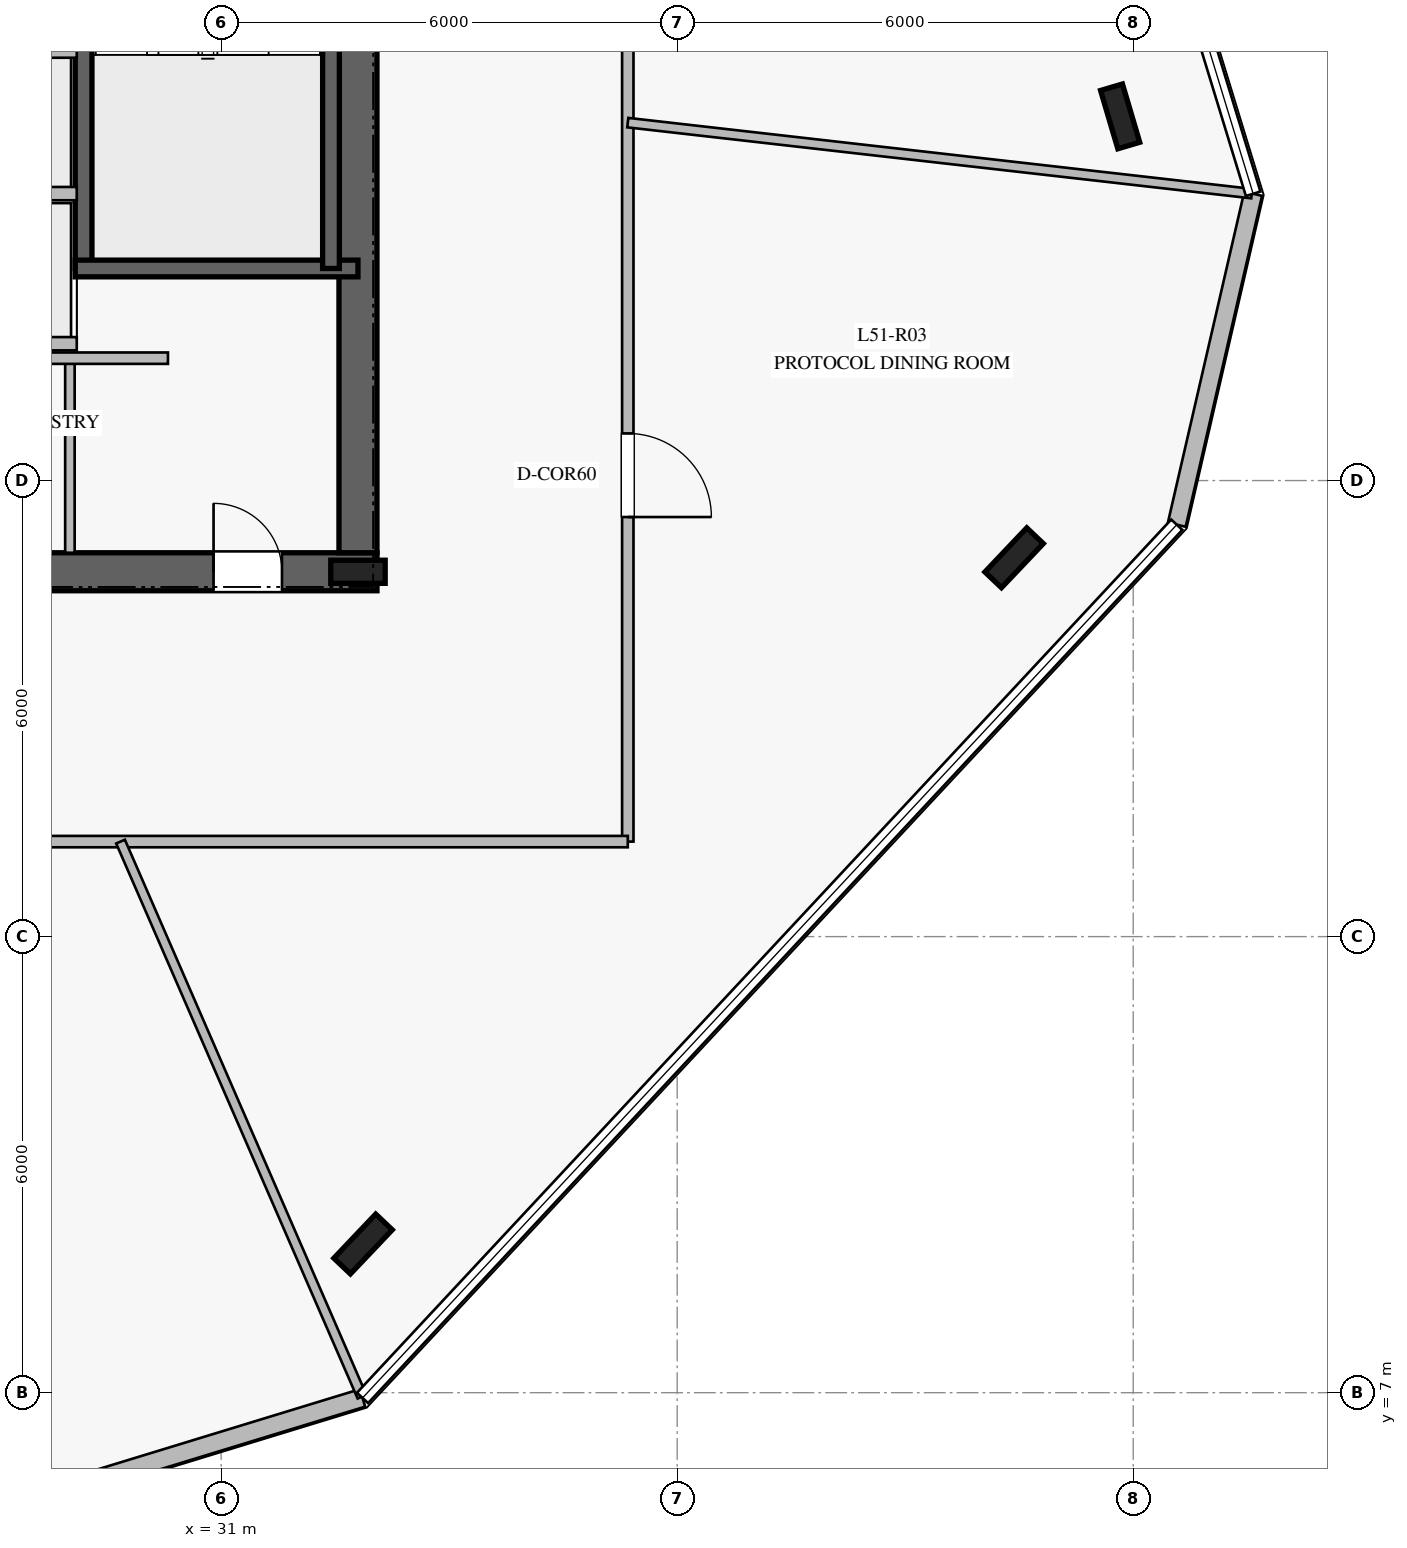
"""IFC4 building model, lengths in metres.
Left out: names, types, materials, properties, quantities, classifications, styles, units other than length and angle.
Written with IfcOpenShell. Run it as: python <this file> out.ifc"""

import sys

from ifc_helpers import new_model, si_unit, direction, frame, frame_2d, origin, origin_2d, place, context, subcontext, project, spatial, rectangle, i_section, extrude, element, fill, save


model = new_model("IFC4")
c1 = context("Model", 3, precision=1e-05, world=origin(), true_north=direction((0.0, 1.0)))
c2 = subcontext(c1, "Body", "Model", "MODEL_VIEW")
j1 = project(units=[si_unit("LENGTHUNIT", "METRE"), si_unit("PLANEANGLEUNIT", "RADIAN")], contexts=[c1])
p1 = place(None, origin())
s1 = spatial("IfcSite", under=j1, at=p1, CompositionType="ELEMENT")
p2 = place(p1, origin())
s2 = spatial("IfcBuilding", under=s1, at=p2, CompositionType="ELEMENT")
p3 = place(p2, frame((0.0, 0.0, 212.8)))
s3 = spatial("IfcBuildingStorey", under=s2, at=p3, CompositionType="ELEMENT", Elevation=212.8)
p4 = place(p3, frame((16.95, 17.8, 0.0), z_axis=(0.0, 0.0, 1.0), x_axis=(1.0, 0.0, 0.0)))
e1 = element("IfcWall", 1, at=p4, inside=s3, PredefinedType="SHEAR", context=c2, shape_type="SweptSolid", body=[
    extrude(rectangle(XDim=16.1, YDim=0.5, at=frame_2d((8.05, 0.0))), origin(), (0.0, 0.0, 1.0), 3.78),
])
p5 = place(p4, frame((5.0, 0.0, 0.0)))
e2 = element("IfcOpeningElement", 2, at=p5, cuts=e1, PredefinedType="OPENING", context=c2, shape_type="SweptSolid", body=[
    extrude(rectangle(XDim=1.2, YDim=2.25, at=frame_2d((0.6, 1.125))), frame((0.0, 0.26, 0.0), z_axis=(0.0, -1.0, 0.0), x_axis=(1.0, 0.0, 0.0)), (0.0, 0.0, 1.0), 0.52),
])
p6 = place(p4, frame((13.95, 0.0, 0.0)))
e3 = element("IfcOpeningElement", 3, at=p6, cuts=e1, PredefinedType="OPENING", context=c2, shape_type="SweptSolid", body=[
    extrude(rectangle(XDim=0.9, YDim=2.1, at=frame_2d((0.45, 1.05))), frame((0.0, 0.26, 0.0), z_axis=(0.0, -1.0, 0.0), x_axis=(1.0, 0.0, 0.0)), (0.0, 0.0, 1.0), 0.52),
])
p7 = place(p4, frame((9.2, 0.0, 0.0)))
e4 = element("IfcOpeningElement", 4, at=p7, cuts=e1, PredefinedType="OPENING", context=c2, shape_type="SweptSolid", body=[
    extrude(rectangle(XDim=1.1, YDim=2.2, at=frame_2d((0.55, 1.1))), frame((0.0, 0.26, 0.0), z_axis=(0.0, -1.0, 0.0), x_axis=(1.0, 0.0, 0.0)), (0.0, 0.0, 1.0), 0.52),
])
p8 = place(p3, frame((32.8, 18.05, 0.0), z_axis=(0.0, 0.0, 1.0), x_axis=(0.0, 1.0, 0.0)))
e5 = element("IfcWall", 5, at=p8, inside=s3, PredefinedType="SHEAR", context=c2, shape_type="SweptSolid", body=[
    extrude(rectangle(XDim=13.9, YDim=0.5, at=frame_2d((6.95, 0.0))), origin(), (0.0, 0.0, 1.0), 3.78),
])
p9 = place(p3, frame((32.8, 17.8, 0.0), z_axis=(0.0, 0.0, 1.0), x_axis=(1.0, 0.0, 0.0)))
e6 = element("IfcColumn", 6, at=p9, inside=s3, PredefinedType="COLUMN", context=c2, shape_type="SweptSolid", body=[
    extrude(i_section(OverallWidth=0.304, OverallDepth=0.716, WebThickness=0.021, FlangeThickness=0.04, at=origin_2d()), origin(), (0.0, 0.0, 1.0), 4.0),
])
p10 = place(p3, frame((29.19, 21.79, 0.0), z_axis=(0.0, 0.0, 1.0), x_axis=(0.0, 1.0, 0.0)))
e7 = element("IfcWall", 7, at=p10, inside=s3, PredefinedType="SOLIDWALL", context=c2, shape_type="SweptSolid", body=[
    extrude(rectangle(XDim=7.22, YDim=0.22, at=frame_2d((3.61, 0.0))), origin(), (0.0, 0.0, 1.0), 3.78),
])
p11 = place(p10, frame((5.88, 0.0, 0.0)))
e8 = element("IfcOpeningElement", 8, at=p11, cuts=e7, PredefinedType="OPENING", context=c2, shape_type="SweptSolid", body=[
    extrude(rectangle(XDim=1.15, YDim=2.2, at=frame_2d((0.575, 1.1))), frame((0.0, 0.12, 0.0), z_axis=(0.0, -1.0, 0.0), x_axis=(1.0, 0.0, 0.0)), (0.0, 0.0, 1.0), 0.24),
])
p12 = place(p3, frame((29.08, 21.79, 0.0), z_axis=(0.0, 0.0, 1.0), x_axis=(1.0, 0.0, 0.0)))
e9 = element("IfcWall", 9, at=p12, inside=s3, PredefinedType="SOLIDWALL", context=c2, shape_type="SweptSolid", body=[
    extrude(rectangle(XDim=3.72, YDim=0.22, at=frame_2d((1.86, 0.0))), origin(), (0.0, 0.0, 1.0), 3.78),
])
p13 = place(p3, frame((32.445, 29.01, 0.0), z_axis=(0.0, 0.0, 1.0), x_axis=(0.0, -1.0, 0.0)))
e10 = element("IfcWall", 10, at=p13, inside=s3, PredefinedType="SOLIDWALL", context=c2, shape_type="SweptSolid", body=[
    extrude(rectangle(XDim=7.22, YDim=0.22, at=frame_2d((3.61, 0.0))), origin(), (0.0, 0.0, 1.0), 3.78),
])
for number, where, z_axis, x_axis in (
    (11, (32.867, 8.956, 0.0), (0.0, 0.0, 1.0), (0.688, 0.725, 0.0)),
    (12, (41.433, 17.984, 0.0), (0.0, 0.0, 1.0), (0.688, 0.725, 0.0)),
    (13, (42.828, 23.791, 0.0), (0.0, 0.0, 1.0), (-0.284, 0.959, 0.0)),
):
    element("IfcColumn", number, at=place(p3, frame(where, z_axis=z_axis, x_axis=x_axis)), inside=s3, PredefinedType="COLUMN", context=c2, shape_type="SweptSolid", body=[
        extrude(i_section(OverallWidth=0.3, OverallDepth=0.8, WebThickness=0.018, FlangeThickness=0.033, at=origin_2d()), origin(), (0.0, 0.0, 1.0), 4.0),
    ])
p14 = place(p3, frame((28.588, 5.625, 0.0), z_axis=(0.0, 0.0, 1.0), x_axis=(0.956319747301, 0.29232266577, 0.0)))
e14 = element("IfcWall", 14, at=p14, inside=s3, PredefinedType="STANDARD", context=c2, shape_type="SweptSolid", body=[
    extrude(rectangle(XDim=4.467, YDim=0.24, at=frame_2d((2.234, 0.0))), origin(), (0.0, 0.0, 1.0), 3.78),
])
p15 = place(p3, frame((43.573, 18.419, 0.0), z_axis=(0.0, 0.0, 1.0), x_axis=(0.224883448427, 0.974385670371, 0.0)))
e15 = element("IfcWall", 15, at=p15, inside=s3, PredefinedType="STANDARD", context=c2, shape_type="SweptSolid", body=[
    extrude(rectangle(XDim=4.469, YDim=0.24, at=frame_2d((2.234, 0.0))), origin(), (0.0, 0.0, 1.0), 3.78),
])
p16 = place(p3, frame((29.01, 18.05, 0.0), z_axis=(0.0, 0.0, 1.0), x_axis=(0.0, 1.0, 0.0)))
e16 = element("IfcWall", 16, at=p16, inside=s3, PredefinedType="PARTITIONING", context=c2, shape_type="SweptSolid", body=[
    extrude(rectangle(XDim=2.5, YDim=0.125, at=frame_2d((1.25, 0.0))), origin(), (0.0, 0.0, 1.0), 3.78),
])
p17 = place(p3, frame((24.4, 20.61, 0.0), z_axis=(0.0, 0.0, 1.0), x_axis=(1.0, 0.0, 0.0)))
e17 = element("IfcWall", 17, at=p17, inside=s3, PredefinedType="PARTITIONING", context=c2, shape_type="SweptSolid", body=[
    extrude(rectangle(XDim=5.9, YDim=0.15, at=frame_2d((2.95, 0.0))), origin(), (0.0, 0.0, 1.0), 3.78),
])
for number, where, z_axis, x_axis in (
    (18, (26.75, 20.8, 0.0), (0.0, 0.0, 1.0), (1.0, 0.0, 0.0)),
    (19, (26.75, 22.775, 0.0), (0.0, 0.0, 1.0), (1.0, 0.0, 0.0)),
    (20, (26.75, 24.65, 0.0), (0.0, 0.0, 1.0), (1.0, 0.0, 0.0)),
):
    element("IfcWall", number, at=place(p3, frame(where, z_axis=z_axis, x_axis=x_axis)), inside=s3, PredefinedType="PARTITIONING", context=c2, shape_type="SweptSolid", body=[
        extrude(rectangle(XDim=2.35, YDim=0.175, at=frame_2d((1.175, 0.0))), origin(), (0.0, 0.0, 1.0), 3.78),
    ])
p18 = place(p3, frame((36.35, 35.75, 0.0), z_axis=(0.0, 0.0, 1.0), x_axis=(0.0, -1.0, 0.0)))
e21 = element("IfcWall", 21, at=p18, inside=s3, PredefinedType="PARTITIONING", context=c2, shape_type="SweptSolid", body=[
    extrude(rectangle(XDim=21.5, YDim=0.15, at=frame_2d((10.75, 0.0))), origin(), (0.0, 0.0, 1.0), 3.02),
])
p19 = place(p18, frame((16.13, 0.0, 0.0)))
e22 = element("IfcOpeningElement", 22, at=p19, cuts=e21, PredefinedType="OPENING", context=c2, shape_type="SweptSolid", body=[
    extrude(rectangle(XDim=1.1, YDim=2.2, at=frame_2d((0.55, 1.1))), frame((0.0, 0.085, 0.0), z_axis=(0.0, -1.0, 0.0), x_axis=(1.0, 0.0, 0.0)), (0.0, 0.0, 1.0), 0.17),
])
p20 = place(p18, frame((5.966, 0.0, 0.0)))
e23 = element("IfcOpeningElement", 23, at=p20, cuts=e21, PredefinedType="OPENING", context=c2, shape_type="SweptSolid", body=[
    extrude(rectangle(XDim=1.1, YDim=2.2, at=frame_2d((0.55, 1.1))), frame((0.0, 0.085, 0.0), z_axis=(0.0, -1.0, 0.0), x_axis=(1.0, 0.0, 0.0)), (0.0, 0.0, 1.0), 0.17),
])
p21 = place(p3, frame((36.35, 14.25, 0.0), z_axis=(0.0, 0.0, 1.0), x_axis=(-1.0, 0.0, 0.0)))
e24 = element("IfcWall", 24, at=p21, inside=s3, PredefinedType="PARTITIONING", context=c2, shape_type="SweptSolid", body=[
    extrude(rectangle(XDim=22.7, YDim=0.15, at=frame_2d((11.35, 0.0))), origin(), (0.0, 0.0, 1.0), 3.02),
])
p22 = place(p21, frame((18.757, 0.0, 0.0)))
e25 = element("IfcOpeningElement", 25, at=p22, cuts=e24, PredefinedType="OPENING", context=c2, shape_type="SweptSolid", body=[
    extrude(rectangle(XDim=1.1, YDim=2.2, at=frame_2d((0.55, 1.1))), frame((0.0, 0.085, 0.0), z_axis=(0.0, -1.0, 0.0), x_axis=(1.0, 0.0, 0.0)), (0.0, 0.0, 1.0), 0.17),
])
p23 = place(p21, frame((10.91, 0.0, 0.0)))
e26 = element("IfcOpeningElement", 26, at=p23, cuts=e24, PredefinedType="OPENING", context=c2, shape_type="SweptSolid", body=[
    extrude(rectangle(XDim=1.1, YDim=2.2, at=frame_2d((0.55, 1.1))), frame((0.0, 0.085, 0.0), z_axis=(0.0, -1.0, 0.0), x_axis=(1.0, 0.0, 0.0)), (0.0, 0.0, 1.0), 0.17),
])
p24 = place(p3, frame((29.676, 14.25, 0.0), z_axis=(0.0, 0.0, 1.0), x_axis=(0.398960400316, -0.916968155925, 0.0)))
e27 = element("IfcWall", 27, at=p24, inside=s3, PredefinedType="PARTITIONING", context=c2, shape_type="SweptSolid", body=[
    extrude(rectangle(XDim=7.963, YDim=0.125, at=frame_2d((3.981, 0.0))), origin(), (0.0, 0.0, 1.0), 3.18),
])
p25 = place(p3, frame((36.35, 23.709, 0.0), z_axis=(0.0, 0.0, 1.0), x_axis=(0.993589877184, -0.113044928931, 0.0)))
e28 = element("IfcWall", 28, at=p25, inside=s3, PredefinedType="PARTITIONING", context=c2, shape_type="SweptSolid", body=[
    extrude(rectangle(XDim=8.263, YDim=0.125, at=frame_2d((4.131, 0.0))), origin(), (0.0, 0.0, 1.0), 3.05),
])
p26 = place(p6, origin())
e29 = element("IfcDoor", 29, at=p26, inside=s3, OperationType="SINGLE_SWING_LEFT", PredefinedType="DOOR", context=c2, shape_type="SweptSolid", body=[
    extrude(rectangle(XDim=0.9, YDim=2.1, at=frame_2d((0.45, 1.05))), frame((0.0, 0.025, 0.0), z_axis=(0.0, -1.0, 0.0), x_axis=(1.0, 0.0, 0.0)), (0.0, 0.0, 1.0), 0.05),
])
fill(e3, e29)
p27 = place(p19, origin())
e30 = element("IfcDoor", 30, at=p27, inside=s3, OperationType="SINGLE_SWING_RIGHT", PredefinedType="DOOR", context=c2, shape_type="SweptSolid", body=[
    extrude(rectangle(XDim=1.1, YDim=2.2, at=frame_2d((0.55, 1.1))), frame((0.0, 0.025, 0.0), z_axis=(0.0, -1.0, 0.0), x_axis=(1.0, 0.0, 0.0)), (0.0, 0.0, 1.0), 0.05),
])
fill(e22, e30)
save(model, sys.argv[1])
